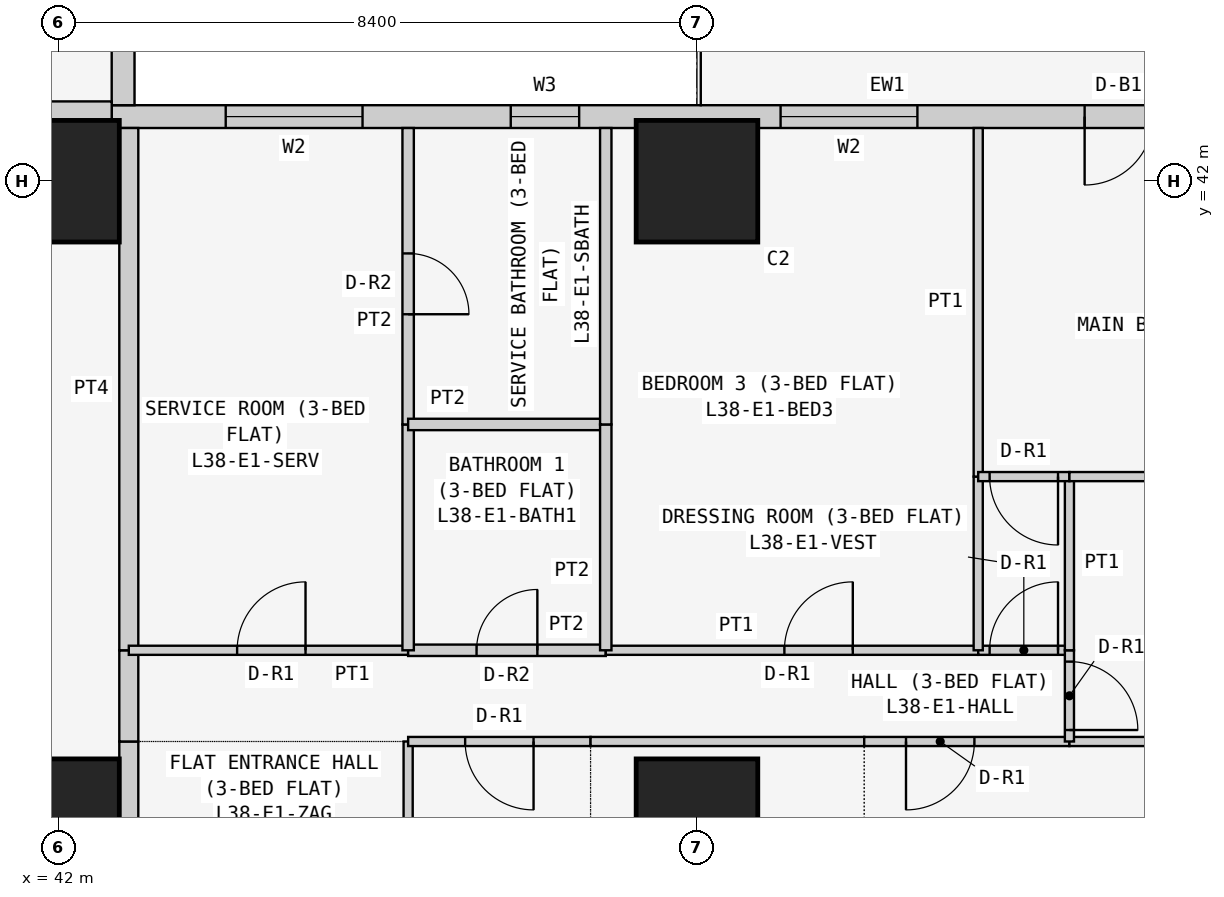
"""IFC4 building model, lengths in metres.
Left out: names, types, materials, properties, quantities, classifications, styles, units other than length and angle.
Written with IfcOpenShell. Run it as: python <this file> out.ifc"""

import sys

from ifc_helpers import new_model, si_unit, direction, frame, frame_2d, origin, origin_2d, place, context, subcontext, project, spatial, rectangle, extrude, element, fill, save


model = new_model("IFC4")
c1 = context("Model", 3, precision=1e-05, world=origin(), true_north=direction((0.0, 1.0)))
c2 = subcontext(c1, "Body", "Model", "MODEL_VIEW")
j1 = project(units=[si_unit("LENGTHUNIT", "METRE"), si_unit("PLANEANGLEUNIT", "RADIAN")], contexts=[c1])
p1 = place(None, origin())
s1 = spatial("IfcSite", under=j1, at=p1, CompositionType="ELEMENT")
p2 = place(p1, origin())
s2 = spatial("IfcBuilding", under=s1, at=p2, CompositionType="ELEMENT")
p3 = place(p2, frame((0.0, 0.0, 148.5)))
s3 = spatial("IfcBuildingStorey", under=s2, at=p3, CompositionType="ELEMENT", Elevation=148.5)
for number, where, z_axis, x_axis in (
    (1, (42.0, 33.6, 0.0), (0.0, 0.0, 1.0), (1.0, 0.0, 0.0)),
    (2, (42.0, 42.0, 0.0), (0.0, 0.0, 1.0), (1.0, 0.0, 0.0)),
    (3, (50.4, 33.6, 0.0), (0.0, 0.0, 1.0), (1.0, 0.0, 0.0)),
    (4, (50.4, 42.0, 0.0), (0.0, 0.0, 1.0), (1.0, 0.0, 0.0)),
):
    element("IfcColumn", number, at=place(p3, frame(where, z_axis=z_axis, x_axis=x_axis)), inside=s3, PredefinedType="COLUMN", context=c2, shape_type="SweptSolid", body=[
        extrude(rectangle(XDim=1.6, YDim=1.6, at=origin_2d()), origin(), (0.0, 0.0, 1.0), 3.6),
    ])
p4 = place(p3, frame((58.4, 42.85, 0.0), z_axis=(0.0, 0.0, 1.0), x_axis=(-1.0, 0.0, 0.0)))
e5 = element("IfcWall", 5, at=p4, inside=s3, PredefinedType="SOLIDWALL", context=c2, shape_type="SweptSolid", body=[
    extrude(rectangle(XDim=15.7, YDim=0.3, at=frame_2d((7.85, 0.0))), origin(), (0.0, 0.0, 1.0), 3.45),
])
p5 = place(p4, frame((12.4, 0.0, 0.9)))
e6 = element("IfcOpeningElement", 6, at=p5, cuts=e5, PredefinedType="OPENING", context=c2, shape_type="SweptSolid", body=[
    extrude(rectangle(XDim=1.8, YDim=1.5, at=frame_2d((0.9, 0.75))), frame((0.0, 0.16, 0.0), z_axis=(0.0, -1.0, 0.0), x_axis=(1.0, 0.0, 0.0)), (0.0, 0.0, 1.0), 0.32),
])
p6 = place(p4, frame((9.55, 0.0, 1.5)))
e7 = element("IfcOpeningElement", 7, at=p6, cuts=e5, PredefinedType="OPENING", context=c2, shape_type="SweptSolid", body=[
    extrude(rectangle(XDim=0.9, YDim=0.7, at=frame_2d((0.45, 0.35))), frame((0.0, 0.16, 0.0), z_axis=(0.0, -1.0, 0.0), x_axis=(1.0, 0.0, 0.0)), (0.0, 0.0, 1.0), 0.32),
])
p7 = place(p4, frame((5.1, 0.0, 0.9)))
e8 = element("IfcOpeningElement", 8, at=p7, cuts=e5, PredefinedType="OPENING", context=c2, shape_type="SweptSolid", body=[
    extrude(rectangle(XDim=1.8, YDim=1.5, at=frame_2d((0.9, 0.75))), frame((0.0, 0.16, 0.0), z_axis=(0.0, -1.0, 0.0), x_axis=(1.0, 0.0, 0.0)), (0.0, 0.0, 1.0), 0.32),
])
p8 = place(p4, frame((2.0, 0.0, 0.0)))
e9 = element("IfcOpeningElement", 9, at=p8, cuts=e5, PredefinedType="OPENING", context=c2, shape_type="SweptSolid", body=[
    extrude(rectangle(XDim=0.9, YDim=2.4, at=frame_2d((0.45, 1.2))), frame((0.0, 0.16, 0.0), z_axis=(0.0, -1.0, 0.0), x_axis=(1.0, 0.0, 0.0)), (0.0, 0.0, 1.0), 0.32),
])
p9 = place(p4, frame((0.7, 0.0, 0.9)))
e10 = element("IfcOpeningElement", 10, at=p9, cuts=e5, PredefinedType="OPENING", context=c2, shape_type="SweptSolid", body=[
    extrude(rectangle(XDim=1.2, YDim=1.5, at=frame_2d((0.6, 0.75))), frame((0.0, 0.16, 0.0), z_axis=(0.0, -1.0, 0.0), x_axis=(1.0, 0.0, 0.0)), (0.0, 0.0, 1.0), 0.32),
])
p10 = place(p3, frame((42.85, 43.0, 0.0), z_axis=(0.0, 0.0, 1.0), x_axis=(0.0, 1.0, 0.0)))
e11 = element("IfcWall", 11, at=p10, inside=s3, PredefinedType="SOLIDWALL", context=c2, shape_type="SweptSolid", body=[
    extrude(rectangle(XDim=7.0, YDim=0.3, at=frame_2d((3.5, 0.0))), origin(), (0.0, 0.0, 1.0), 3.45),
])
p11 = place(p10, frame((1.5, 0.0, 0.9)))
e12 = element("IfcOpeningElement", 12, at=p11, cuts=e11, PredefinedType="OPENING", context=c2, shape_type="SweptSolid", body=[
    extrude(rectangle(XDim=2.4, YDim=1.5, at=frame_2d((1.2, 0.75))), frame((0.0, 0.16, 0.0), z_axis=(0.0, -1.0, 0.0), x_axis=(1.0, 0.0, 0.0)), (0.0, 0.0, 1.0), 0.32),
])
p12 = place(p10, frame((5.05, 0.0, 0.9)))
e13 = element("IfcOpeningElement", 13, at=p12, cuts=e11, PredefinedType="OPENING", context=c2, shape_type="SweptSolid", body=[
    extrude(rectangle(XDim=1.2, YDim=1.5, at=frame_2d((0.6, 0.75))), frame((0.0, 0.16, 0.0), z_axis=(0.0, -1.0, 0.0), x_axis=(1.0, 0.0, 0.0)), (0.0, 0.0, 1.0), 0.32),
])
p13 = place(p3, frame((36.229, 42.925, 0.0), z_axis=(0.0, 0.0, 1.0), x_axis=(1.0, 0.0, 0.0)))
e14 = element("IfcWall", 14, at=p13, inside=s3, PredefinedType="PARTITIONING", context=c2, shape_type="SweptSolid", body=[
    extrude(rectangle(XDim=6.471, YDim=0.25, at=frame_2d((3.235, 0.0))), origin(), (0.0, 0.0, 1.0), 3.45),
])
p14 = place(p3, frame((42.925, 34.629, 0.0), z_axis=(0.0, 0.0, 1.0), x_axis=(0.0, -1.0, 0.0)))
e15 = element("IfcWall", 15, at=p14, inside=s3, PredefinedType="PARTITIONING", context=c2, shape_type="SweptSolid", body=[
    extrude(rectangle(XDim=5.229, YDim=0.25, at=frame_2d((2.615, 0.0))), origin(), (0.0, 0.0, 1.0), 3.45),
])
p15 = place(p14, frame((2.129, 0.0, 0.0)))
e16 = element("IfcOpeningElement", 16, at=p15, cuts=e15, PredefinedType="OPENING", context=c2, shape_type="SweptSolid", body=[
    extrude(rectangle(XDim=1.0, YDim=2.1, at=frame_2d((0.5, 1.05))), frame((0.0, 0.135, 0.0), z_axis=(0.0, -1.0, 0.0), x_axis=(1.0, 0.0, 0.0)), (0.0, 0.0, 1.0), 0.27),
])
p16 = place(p3, frame((42.925, 35.829, 0.0), z_axis=(0.0, 0.0, 1.0), x_axis=(0.0, -1.0, 0.0)))
e17 = element("IfcWall", 17, at=p16, inside=s3, PredefinedType="PARTITIONING", context=c2, shape_type="SweptSolid", body=[
    extrude(rectangle(XDim=1.2, YDim=0.25, at=frame_2d((0.6, 0.0))), origin(), (0.0, 0.0, 1.0), 3.45),
])
p17 = place(p3, frame((42.925, 42.7, 0.0), z_axis=(0.0, 0.0, 1.0), x_axis=(0.0, -1.0, 0.0)))
e18 = element("IfcWall", 18, at=p17, inside=s3, PredefinedType="PARTITIONING", context=c2, shape_type="SweptSolid", body=[
    extrude(rectangle(XDim=6.871, YDim=0.25, at=frame_2d((3.436, 0.0))), origin(), (0.0, 0.0, 1.0), 3.45),
])
p18 = place(p3, frame((46.6, 29.4, 0.0), z_axis=(0.0, 0.0, 1.0), x_axis=(0.0, 1.0, 0.0)))
e19 = element("IfcWall", 19, at=p18, inside=s3, PredefinedType="PARTITIONING", context=c2, shape_type="SweptSolid", body=[
    extrude(rectangle(XDim=5.229, YDim=0.12, at=frame_2d((2.615, 0.0))), origin(), (0.0, 0.0, 1.0), 3.45),
])
p19 = place(p3, frame((49.0, 34.629, 0.0), z_axis=(0.0, 0.0, 1.0), x_axis=(-1.0, 0.0, 0.0)))
e20 = element("IfcWall", 20, at=p19, inside=s3, PredefinedType="PARTITIONING", context=c2, shape_type="SweptSolid", body=[
    extrude(rectangle(XDim=2.4, YDim=0.12, at=frame_2d((1.2, 0.0))), origin(), (0.0, 0.0, 1.0), 3.45),
])
p20 = place(p19, frame((0.75, 0.0, 0.0)))
e21 = element("IfcOpeningElement", 21, at=p20, cuts=e20, PredefinedType="OPENING", context=c2, shape_type="SweptSolid", body=[
    extrude(rectangle(XDim=0.9, YDim=2.1, at=frame_2d((0.45, 1.05))), frame((0.0, 0.07, 0.0), z_axis=(0.0, -1.0, 0.0), x_axis=(1.0, 0.0, 0.0)), (0.0, 0.0, 1.0), 0.14),
])
p21 = place(p3, frame((52.6, 34.629, 0.0), z_axis=(0.0, 0.0, 1.0), x_axis=(-1.0, 0.0, 0.0)))
e22 = element("IfcWall", 22, at=p21, inside=s3, PredefinedType="PARTITIONING", context=c2, shape_type="SweptSolid", body=[
    extrude(rectangle(XDim=3.6, YDim=0.12, at=frame_2d((1.8, 0.0))), origin(), (0.0, 0.0, 1.0), 3.45),
])
p22 = place(p3, frame((55.3, 34.629, 0.0), z_axis=(0.0, 0.0, 1.0), x_axis=(-1.0, 0.0, 0.0)))
e23 = element("IfcWall", 23, at=p22, inside=s3, PredefinedType="PARTITIONING", context=c2, shape_type="SweptSolid", body=[
    extrude(rectangle(XDim=2.7, YDim=0.12, at=frame_2d((1.35, 0.0))), origin(), (0.0, 0.0, 1.0), 3.45),
])
p23 = place(p22, frame((1.25, 0.0, 0.0)))
e24 = element("IfcOpeningElement", 24, at=p23, cuts=e23, PredefinedType="OPENING", context=c2, shape_type="SweptSolid", body=[
    extrude(rectangle(XDim=0.9, YDim=2.1, at=frame_2d((0.45, 1.05))), frame((0.0, 0.07, 0.0), z_axis=(0.0, -1.0, 0.0), x_axis=(1.0, 0.0, 0.0)), (0.0, 0.0, 1.0), 0.14),
])
p24 = place(p3, frame((59.45, 34.629, 0.0), z_axis=(0.0, 0.0, 1.0), x_axis=(-1.0, 0.0, 0.0)))
e25 = element("IfcWall", 25, at=p24, inside=s3, PredefinedType="PARTITIONING", context=c2, shape_type="SweptSolid", body=[
    extrude(rectangle(XDim=4.15, YDim=0.12, at=frame_2d((2.075, 0.0))), origin(), (0.0, 0.0, 1.0), 3.45),
])
p25 = place(p3, frame((46.6, 35.829, 0.0), z_axis=(0.0, 0.0, 1.0), x_axis=(-1.0, 0.0, 0.0)))
e26 = element("IfcWall", 26, at=p25, inside=s3, PredefinedType="PARTITIONING", context=c2, shape_type="SweptSolid", body=[
    extrude(rectangle(XDim=3.675, YDim=0.12, at=frame_2d((1.837, 0.0))), origin(), (0.0, 0.0, 1.0), 3.45),
])
p26 = place(p25, frame((1.35, 0.0, 0.0)))
e27 = element("IfcOpeningElement", 27, at=p26, cuts=e26, PredefinedType="OPENING", context=c2, shape_type="SweptSolid", body=[
    extrude(rectangle(XDim=0.9, YDim=2.1, at=frame_2d((0.45, 1.05))), frame((0.0, 0.07, 0.0), z_axis=(0.0, -1.0, 0.0), x_axis=(1.0, 0.0, 0.0)), (0.0, 0.0, 1.0), 0.14),
])
p27 = place(p3, frame((49.2, 35.829, 0.0), z_axis=(0.0, 0.0, 1.0), x_axis=(-1.0, 0.0, 0.0)))
e28 = element("IfcWall", 28, at=p27, inside=s3, PredefinedType="PARTITIONING", context=c2, shape_type="SweptSolid", body=[
    extrude(rectangle(XDim=2.6, YDim=0.15, at=frame_2d((1.3, 0.0))), origin(), (0.0, 0.0, 1.0), 3.45),
])
p28 = place(p27, frame((0.9, 0.0, 0.0)))
e29 = element("IfcOpeningElement", 29, at=p28, cuts=e28, PredefinedType="OPENING", context=c2, shape_type="SweptSolid", body=[
    extrude(rectangle(XDim=0.8, YDim=2.1, at=frame_2d((0.4, 1.05))), frame((0.0, 0.085, 0.0), z_axis=(0.0, -1.0, 0.0), x_axis=(1.0, 0.0, 0.0)), (0.0, 0.0, 1.0), 0.17),
])
p29 = place(p3, frame((54.1, 35.829, 0.0), z_axis=(0.0, 0.0, 1.0), x_axis=(-1.0, 0.0, 0.0)))
e30 = element("IfcWall", 30, at=p29, inside=s3, PredefinedType="PARTITIONING", context=c2, shape_type="SweptSolid", body=[
    extrude(rectangle(XDim=4.9, YDim=0.12, at=frame_2d((2.45, 0.0))), origin(), (0.0, 0.0, 1.0), 3.45),
])
p30 = place(p29, frame((1.65, 0.0, 0.0)))
e31 = element("IfcOpeningElement", 31, at=p30, cuts=e30, PredefinedType="OPENING", context=c2, shape_type="SweptSolid", body=[
    extrude(rectangle(XDim=0.9, YDim=2.1, at=frame_2d((0.45, 1.05))), frame((0.0, 0.07, 0.0), z_axis=(0.0, -1.0, 0.0), x_axis=(1.0, 0.0, 0.0)), (0.0, 0.0, 1.0), 0.14),
])
p31 = place(p3, frame((55.3, 35.829, 0.0), z_axis=(0.0, 0.0, 1.0), x_axis=(-1.0, 0.0, 0.0)))
e32 = element("IfcWall", 32, at=p31, inside=s3, PredefinedType="PARTITIONING", context=c2, shape_type="SweptSolid", body=[
    extrude(rectangle(XDim=1.2, YDim=0.12, at=frame_2d((0.6, 0.0))), origin(), (0.0, 0.0, 1.0), 3.45),
])
p32 = place(p31, frame((0.15, 0.0, 0.0)))
e33 = element("IfcOpeningElement", 33, at=p32, cuts=e32, PredefinedType="OPENING", context=c2, shape_type="SweptSolid", body=[
    extrude(rectangle(XDim=0.9, YDim=2.1, at=frame_2d((0.45, 1.05))), frame((0.0, 0.07, 0.0), z_axis=(0.0, -1.0, 0.0), x_axis=(1.0, 0.0, 0.0)), (0.0, 0.0, 1.0), 0.14),
])
p33 = place(p3, frame((55.3, 34.629, 0.0), z_axis=(0.0, 0.0, 1.0), x_axis=(0.0, 1.0, 0.0)))
e34 = element("IfcWall", 34, at=p33, inside=s3, PredefinedType="PARTITIONING", context=c2, shape_type="SweptSolid", body=[
    extrude(rectangle(XDim=1.2, YDim=0.12, at=frame_2d((0.6, 0.0))), origin(), (0.0, 0.0, 1.0), 3.45),
])
p34 = place(p33, frame((0.151, 0.0, 0.0)))
e35 = element("IfcOpeningElement", 35, at=p34, cuts=e34, PredefinedType="OPENING", context=c2, shape_type="SweptSolid", body=[
    extrude(rectangle(XDim=0.9, YDim=2.1, at=frame_2d((0.45, 1.05))), frame((0.0, 0.07, 0.0), z_axis=(0.0, -1.0, 0.0), x_axis=(1.0, 0.0, 0.0)), (0.0, 0.0, 1.0), 0.14),
])
p35 = place(p3, frame((46.6, 35.829, 0.0), z_axis=(0.0, 0.0, 1.0), x_axis=(0.0, 1.0, 0.0)))
e36 = element("IfcWall", 36, at=p35, inside=s3, PredefinedType="PARTITIONING", context=c2, shape_type="SweptSolid", body=[
    extrude(rectangle(XDim=2.971, YDim=0.15, at=frame_2d((1.485, 0.0))), origin(), (0.0, 0.0, 1.0), 3.45),
])
p36 = place(p3, frame((46.6, 38.8, 0.0), z_axis=(0.0, 0.0, 1.0), x_axis=(0.0, 1.0, 0.0)))
e37 = element("IfcWall", 37, at=p36, inside=s3, PredefinedType="PARTITIONING", context=c2, shape_type="SweptSolid", body=[
    extrude(rectangle(XDim=3.9, YDim=0.15, at=frame_2d((1.95, 0.0))), origin(), (0.0, 0.0, 1.0), 3.45),
])
p37 = place(p36, frame((1.45, 0.0, 0.0)))
e38 = element("IfcOpeningElement", 38, at=p37, cuts=e37, PredefinedType="OPENING", context=c2, shape_type="SweptSolid", body=[
    extrude(rectangle(XDim=0.8, YDim=2.1, at=frame_2d((0.4, 1.05))), frame((0.0, 0.085, 0.0), z_axis=(0.0, -1.0, 0.0), x_axis=(1.0, 0.0, 0.0)), (0.0, 0.0, 1.0), 0.17),
])
p38 = place(p3, frame((49.2, 38.8, 0.0), z_axis=(0.0, 0.0, 1.0), x_axis=(-1.0, 0.0, 0.0)))
e39 = element("IfcWall", 39, at=p38, inside=s3, PredefinedType="PARTITIONING", context=c2, shape_type="SweptSolid", body=[
    extrude(rectangle(XDim=2.6, YDim=0.15, at=frame_2d((1.3, 0.0))), origin(), (0.0, 0.0, 1.0), 3.45),
])
p39 = place(p3, frame((49.2, 35.829, 0.0), z_axis=(0.0, 0.0, 1.0), x_axis=(0.0, 1.0, 0.0)))
e40 = element("IfcWall", 40, at=p39, inside=s3, PredefinedType="PARTITIONING", context=c2, shape_type="SweptSolid", body=[
    extrude(rectangle(XDim=2.971, YDim=0.15, at=frame_2d((1.485, 0.0))), origin(), (0.0, 0.0, 1.0), 3.45),
])
p40 = place(p3, frame((49.2, 38.8, 0.0), z_axis=(0.0, 0.0, 1.0), x_axis=(0.0, 1.0, 0.0)))
e41 = element("IfcWall", 41, at=p40, inside=s3, PredefinedType="PARTITIONING", context=c2, shape_type="SweptSolid", body=[
    extrude(rectangle(XDim=3.9, YDim=0.15, at=frame_2d((1.95, 0.0))), origin(), (0.0, 0.0, 1.0), 3.45),
])
p41 = place(p3, frame((54.1, 35.829, 0.0), z_axis=(0.0, 0.0, 1.0), x_axis=(0.0, 1.0, 0.0)))
e42 = element("IfcWall", 42, at=p41, inside=s3, PredefinedType="PARTITIONING", context=c2, shape_type="SweptSolid", body=[
    extrude(rectangle(XDim=2.285, YDim=0.12, at=frame_2d((1.143, 0.0))), origin(), (0.0, 0.0, 1.0), 3.45),
])
p42 = place(p3, frame((54.1, 38.114, 0.0), z_axis=(0.0, 0.0, 1.0), x_axis=(0.0, 1.0, 0.0)))
e43 = element("IfcWall", 43, at=p42, inside=s3, PredefinedType="PARTITIONING", context=c2, shape_type="SweptSolid", body=[
    extrude(rectangle(XDim=4.586, YDim=0.12, at=frame_2d((2.293, 0.0))), origin(), (0.0, 0.0, 1.0), 3.45),
])
p43 = place(p3, frame((55.3, 35.829, 0.0), z_axis=(0.0, 0.0, 1.0), x_axis=(0.0, 1.0, 0.0)))
e44 = element("IfcWall", 44, at=p43, inside=s3, PredefinedType="PARTITIONING", context=c2, shape_type="SweptSolid", body=[
    extrude(rectangle(XDim=2.285, YDim=0.12, at=frame_2d((1.143, 0.0))), origin(), (0.0, 0.0, 1.0), 3.45),
])
p44 = place(p3, frame((55.3, 38.114, 0.0), z_axis=(0.0, 0.0, 1.0), x_axis=(-1.0, 0.0, 0.0)))
e45 = element("IfcWall", 45, at=p44, inside=s3, PredefinedType="PARTITIONING", context=c2, shape_type="SweptSolid", body=[
    extrude(rectangle(XDim=1.2, YDim=0.12, at=frame_2d((0.6, 0.0))), origin(), (0.0, 0.0, 1.0), 3.45),
])
p45 = place(p44, frame((0.15, 0.0, 0.0)))
e46 = element("IfcOpeningElement", 46, at=p45, cuts=e45, PredefinedType="OPENING", context=c2, shape_type="SweptSolid", body=[
    extrude(rectangle(XDim=0.9, YDim=2.1, at=frame_2d((0.45, 1.05))), frame((0.0, 0.07, 0.0), z_axis=(0.0, -1.0, 0.0), x_axis=(1.0, 0.0, 0.0)), (0.0, 0.0, 1.0), 0.14),
])
p46 = place(p3, frame((59.45, 38.114, 0.0), z_axis=(0.0, 0.0, 1.0), x_axis=(-1.0, 0.0, 0.0)))
e47 = element("IfcWall", 47, at=p46, inside=s3, PredefinedType="PARTITIONING", context=c2, shape_type="SweptSolid", body=[
    extrude(rectangle(XDim=4.15, YDim=0.12, at=frame_2d((2.075, 0.0))), origin(), (0.0, 0.0, 1.0), 3.45),
])
p47 = place(p5, origin())
e48 = element("IfcWindow", 48, at=p47, inside=s3, PartitioningType="SINGLE_PANEL", PredefinedType="WINDOW", context=c2, shape_type="SweptSolid", body=[
    extrude(rectangle(XDim=1.8, YDim=1.5, at=frame_2d((0.9, 0.75))), frame((0.0, 0.03, 0.0), z_axis=(0.0, -1.0, 0.0), x_axis=(1.0, 0.0, 0.0)), (0.0, 0.0, 1.0), 0.06),
])
fill(e6, e48)
p48 = place(p6, origin())
e49 = element("IfcWindow", 49, at=p48, inside=s3, PartitioningType="SINGLE_PANEL", PredefinedType="WINDOW", context=c2, shape_type="SweptSolid", body=[
    extrude(rectangle(XDim=0.9, YDim=0.7, at=frame_2d((0.45, 0.35))), frame((0.0, 0.03, 0.0), z_axis=(0.0, -1.0, 0.0), x_axis=(1.0, 0.0, 0.0)), (0.0, 0.0, 1.0), 0.06),
])
fill(e7, e49)
p49 = place(p7, origin())
e50 = element("IfcWindow", 50, at=p49, inside=s3, PartitioningType="SINGLE_PANEL", PredefinedType="WINDOW", context=c2, shape_type="SweptSolid", body=[
    extrude(rectangle(XDim=1.8, YDim=1.5, at=frame_2d((0.9, 0.75))), frame((0.0, 0.03, 0.0), z_axis=(0.0, -1.0, 0.0), x_axis=(1.0, 0.0, 0.0)), (0.0, 0.0, 1.0), 0.06),
])
fill(e8, e50)
p50 = place(p8, origin())
e51 = element("IfcDoor", 51, at=p50, inside=s3, OperationType="SINGLE_SWING_RIGHT", PredefinedType="DOOR", context=c2, shape_type="SweptSolid", body=[
    extrude(rectangle(XDim=0.9, YDim=2.4, at=frame_2d((0.45, 1.2))), frame((0.0, 0.025, 0.0), z_axis=(0.0, -1.0, 0.0), x_axis=(1.0, 0.0, 0.0)), (0.0, 0.0, 1.0), 0.05),
])
fill(e9, e51)
p51 = place(p20, origin())
e52 = element("IfcDoor", 52, at=p51, inside=s3, OperationType="SINGLE_SWING_LEFT", PredefinedType="DOOR", context=c2, shape_type="SweptSolid", body=[
    extrude(rectangle(XDim=0.9, YDim=2.1, at=frame_2d((0.45, 1.05))), frame((0.0, 0.025, 0.0), z_axis=(0.0, -1.0, 0.0), x_axis=(1.0, 0.0, 0.0)), (0.0, 0.0, 1.0), 0.05),
])
fill(e21, e52)
p52 = place(p23, origin())
e53 = element("IfcDoor", 53, at=p52, inside=s3, OperationType="SINGLE_SWING_RIGHT", PredefinedType="DOOR", context=c2, shape_type="SweptSolid", body=[
    extrude(rectangle(XDim=0.9, YDim=2.1, at=frame_2d((0.45, 1.05))), frame((0.0, 0.025, 0.0), z_axis=(0.0, -1.0, 0.0), x_axis=(1.0, 0.0, 0.0)), (0.0, 0.0, 1.0), 0.05),
])
fill(e24, e53)
p53 = place(p26, frame((0.9, 0.0, 0.0), z_axis=(0.0, 0.0, 1.0), x_axis=(-1.0, 0.0, 0.0)))
e54 = element("IfcDoor", 54, at=p53, inside=s3, OperationType="SINGLE_SWING_RIGHT", PredefinedType="DOOR", context=c2, shape_type="SweptSolid", body=[
    extrude(rectangle(XDim=0.9, YDim=2.1, at=frame_2d((0.45, 1.05))), frame((0.0, 0.025, 0.0), z_axis=(0.0, -1.0, 0.0), x_axis=(1.0, 0.0, 0.0)), (0.0, 0.0, 1.0), 0.05),
])
fill(e27, e54)
p54 = place(p37, frame((0.8, 0.0, 0.0), z_axis=(0.0, 0.0, 1.0), x_axis=(-1.0, 0.0, 0.0)))
e55 = element("IfcDoor", 55, at=p54, inside=s3, OperationType="SINGLE_SWING_RIGHT", PredefinedType="DOOR", context=c2, shape_type="SweptSolid", body=[
    extrude(rectangle(XDim=0.8, YDim=2.1, at=frame_2d((0.4, 1.05))), frame((0.0, 0.025, 0.0), z_axis=(0.0, -1.0, 0.0), x_axis=(1.0, 0.0, 0.0)), (0.0, 0.0, 1.0), 0.05),
])
fill(e38, e55)
p55 = place(p28, frame((0.8, 0.0, 0.0), z_axis=(0.0, 0.0, 1.0), x_axis=(-1.0, 0.0, 0.0)))
e56 = element("IfcDoor", 56, at=p55, inside=s3, OperationType="SINGLE_SWING_RIGHT", PredefinedType="DOOR", context=c2, shape_type="SweptSolid", body=[
    extrude(rectangle(XDim=0.8, YDim=2.1, at=frame_2d((0.4, 1.05))), frame((0.0, 0.025, 0.0), z_axis=(0.0, -1.0, 0.0), x_axis=(1.0, 0.0, 0.0)), (0.0, 0.0, 1.0), 0.05),
])
fill(e29, e56)
p56 = place(p30, frame((0.9, 0.0, 0.0), z_axis=(0.0, 0.0, 1.0), x_axis=(-1.0, 0.0, 0.0)))
e57 = element("IfcDoor", 57, at=p56, inside=s3, OperationType="SINGLE_SWING_RIGHT", PredefinedType="DOOR", context=c2, shape_type="SweptSolid", body=[
    extrude(rectangle(XDim=0.9, YDim=2.1, at=frame_2d((0.45, 1.05))), frame((0.0, 0.025, 0.0), z_axis=(0.0, -1.0, 0.0), x_axis=(1.0, 0.0, 0.0)), (0.0, 0.0, 1.0), 0.05),
])
fill(e31, e57)
p57 = place(p32, frame((0.9, 0.0, 0.0), z_axis=(0.0, 0.0, 1.0), x_axis=(-1.0, 0.0, 0.0)))
e58 = element("IfcDoor", 58, at=p57, inside=s3, OperationType="SINGLE_SWING_RIGHT", PredefinedType="DOOR", context=c2, shape_type="SweptSolid", body=[
    extrude(rectangle(XDim=0.9, YDim=2.1, at=frame_2d((0.45, 1.05))), frame((0.0, 0.025, 0.0), z_axis=(0.0, -1.0, 0.0), x_axis=(1.0, 0.0, 0.0)), (0.0, 0.0, 1.0), 0.05),
])
fill(e33, e58)
p58 = place(p45, origin())
e59 = element("IfcDoor", 59, at=p58, inside=s3, OperationType="SINGLE_SWING_LEFT", PredefinedType="DOOR", context=c2, shape_type="SweptSolid", body=[
    extrude(rectangle(XDim=0.9, YDim=2.1, at=frame_2d((0.45, 1.05))), frame((0.0, 0.025, 0.0), z_axis=(0.0, -1.0, 0.0), x_axis=(1.0, 0.0, 0.0)), (0.0, 0.0, 1.0), 0.05),
])
fill(e46, e59)
p59 = place(p34, frame((0.9, 0.0, 0.0), z_axis=(0.0, 0.0, 1.0), x_axis=(-1.0, 0.0, 0.0)))
e60 = element("IfcDoor", 60, at=p59, inside=s3, OperationType="SINGLE_SWING_RIGHT", PredefinedType="DOOR", context=c2, shape_type="SweptSolid", body=[
    extrude(rectangle(XDim=0.9, YDim=2.1, at=frame_2d((0.45, 1.05))), frame((0.0, 0.025, 0.0), z_axis=(0.0, -1.0, 0.0), x_axis=(1.0, 0.0, 0.0)), (0.0, 0.0, 1.0), 0.05),
])
fill(e35, e60)
save(model, sys.argv[1])
